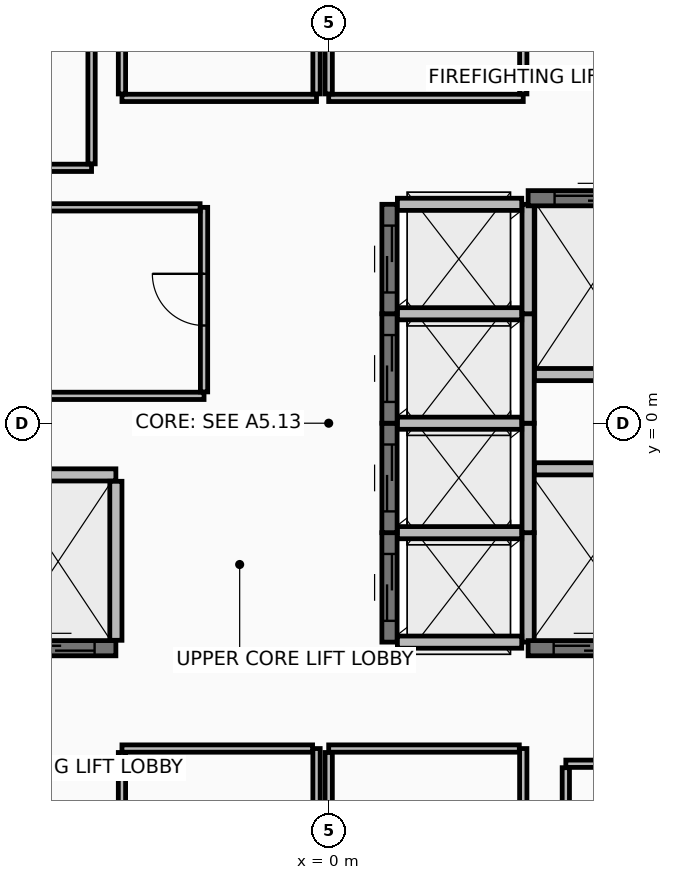
"""IFC4 building model, lengths in metres.
Left out: names, types, materials, properties, quantities, classifications, styles, units other than length and angle.
Written with IfcOpenShell. Run it as: python <this file> out.ifc"""

import sys

from ifc_helpers import new_model, si_unit, direction, frame, frame_2d, origin, place, context, subcontext, project, spatial, rectangle, extrude, element, fill, save


model = new_model("IFC4")
c1 = context("Model", 3, precision=1e-05, world=origin(), true_north=direction((0.0, 1.0)))
c2 = subcontext(c1, "Body", "Model", "MODEL_VIEW")
j1 = project(units=[si_unit("LENGTHUNIT", "METRE"), si_unit("PLANEANGLEUNIT", "RADIAN")], contexts=[c1])
p1 = place(None, origin())
s1 = spatial("IfcSite", under=j1, at=p1, CompositionType="ELEMENT")
p2 = place(p1, origin())
s2 = spatial("IfcBuilding", under=s1, at=p2, CompositionType="ELEMENT")
p3 = place(p2, frame((0.0, 0.0, 279.75)))
s3 = spatial("IfcBuildingStorey", under=s2, at=p3, CompositionType="ELEMENT", Elevation=279.75)
p4 = place(p3, frame((1.0, -3.6, 0.0), z_axis=(0.0, 0.0, 1.0), x_axis=(0.0, 1.0, 0.0)))
e1 = element("IfcWall", 1, at=p4, inside=s3, PredefinedType="SHEAR", context=c2, shape_type="SweptSolid", body=[
    extrude(rectangle(XDim=1.8, YDim=0.25, at=frame_2d((0.9, 0.0))), origin(), (0.0, 0.0, 1.0), 3.465),
])
p5 = place(p4, frame((0.35, 0.0, 0.0)))
e2 = element("IfcOpeningElement", 2, at=p5, cuts=e1, PredefinedType="OPENING", context=c2, shape_type="SweptSolid", body=[
    extrude(rectangle(XDim=1.1, YDim=2.2, at=frame_2d((0.55, 1.1))), frame((0.0, 0.135, 0.0), z_axis=(0.0, -1.0, 0.0), x_axis=(1.0, 0.0, 0.0)), (0.0, 0.0, 1.0), 0.27),
])
p6 = place(p3, frame((3.28, -3.6, 0.0), z_axis=(0.0, 0.0, 1.0), x_axis=(0.0, 1.0, 0.0)))
e3 = element("IfcWall", 3, at=p6, inside=s3, PredefinedType="PARTITIONING", context=c2, shape_type="SweptSolid", body=[
    extrude(rectangle(XDim=1.8, YDim=0.2, at=frame_2d((0.9, 0.0))), origin(), (0.0, 0.0, 1.0), 3.465),
])
for number, where, z_axis, x_axis in (
    (4, (1.13, -3.6, 0.0), (0.0, 0.0, 1.0), (1.0, 0.0, 0.0)),
    (5, (1.13, -1.8, 0.0), (0.0, 0.0, 1.0), (1.0, 0.0, 0.0)),
):
    element("IfcWall", number, at=place(p3, frame(where, z_axis=z_axis, x_axis=x_axis)), inside=s3, PredefinedType="PARTITIONING", context=c2, shape_type="SweptSolid", body=[
        extrude(rectangle(XDim=2.045, YDim=0.2, at=frame_2d((1.022, 0.0))), origin(), (0.0, 0.0, 1.0), 3.465),
    ])
p7 = place(p3, frame((1.0, -1.8, 0.0), z_axis=(0.0, 0.0, 1.0), x_axis=(0.0, 1.0, 0.0)))
e6 = element("IfcWall", 6, at=p7, inside=s3, PredefinedType="SHEAR", context=c2, shape_type="SweptSolid", body=[
    extrude(rectangle(XDim=1.8, YDim=0.25, at=frame_2d((0.9, 0.0))), origin(), (0.0, 0.0, 1.0), 3.465),
])
p8 = place(p7, frame((0.35, 0.0, 0.0)))
e7 = element("IfcOpeningElement", 7, at=p8, cuts=e6, PredefinedType="OPENING", context=c2, shape_type="SweptSolid", body=[
    extrude(rectangle(XDim=1.1, YDim=2.2, at=frame_2d((0.55, 1.1))), frame((0.0, 0.135, 0.0), z_axis=(0.0, -1.0, 0.0), x_axis=(1.0, 0.0, 0.0)), (0.0, 0.0, 1.0), 0.27),
])
p9 = place(p3, frame((3.28, -1.8, 0.0), z_axis=(0.0, 0.0, 1.0), x_axis=(0.0, 1.0, 0.0)))
e8 = element("IfcWall", 8, at=p9, inside=s3, PredefinedType="PARTITIONING", context=c2, shape_type="SweptSolid", body=[
    extrude(rectangle(XDim=1.8, YDim=0.2, at=frame_2d((0.9, 0.0))), origin(), (0.0, 0.0, 1.0), 3.465),
])
p10 = place(p3, frame((1.13, 0.0, 0.0), z_axis=(0.0, 0.0, 1.0), x_axis=(1.0, 0.0, 0.0)))
e9 = element("IfcWall", 9, at=p10, inside=s3, PredefinedType="PARTITIONING", context=c2, shape_type="SweptSolid", body=[
    extrude(rectangle(XDim=2.045, YDim=0.2, at=frame_2d((1.022, 0.0))), origin(), (0.0, 0.0, 1.0), 3.465),
])
p11 = place(p3, frame((1.0, 0.0, 0.0), z_axis=(0.0, 0.0, 1.0), x_axis=(0.0, 1.0, 0.0)))
e10 = element("IfcWall", 10, at=p11, inside=s3, PredefinedType="SHEAR", context=c2, shape_type="SweptSolid", body=[
    extrude(rectangle(XDim=1.8, YDim=0.25, at=frame_2d((0.9, 0.0))), origin(), (0.0, 0.0, 1.0), 3.465),
])
p12 = place(p11, frame((0.35, 0.0, 0.0)))
e11 = element("IfcOpeningElement", 11, at=p12, cuts=e10, PredefinedType="OPENING", context=c2, shape_type="SweptSolid", body=[
    extrude(rectangle(XDim=1.1, YDim=2.2, at=frame_2d((0.55, 1.1))), frame((0.0, 0.135, 0.0), z_axis=(0.0, -1.0, 0.0), x_axis=(1.0, 0.0, 0.0)), (0.0, 0.0, 1.0), 0.27),
])
p13 = place(p3, frame((3.28, 0.0, 0.0), z_axis=(0.0, 0.0, 1.0), x_axis=(0.0, 1.0, 0.0)))
e12 = element("IfcWall", 12, at=p13, inside=s3, PredefinedType="PARTITIONING", context=c2, shape_type="SweptSolid", body=[
    extrude(rectangle(XDim=1.8, YDim=0.2, at=frame_2d((0.9, 0.0))), origin(), (0.0, 0.0, 1.0), 3.465),
])
p14 = place(p3, frame((1.13, 1.8, 0.0), z_axis=(0.0, 0.0, 1.0), x_axis=(1.0, 0.0, 0.0)))
e13 = element("IfcWall", 13, at=p14, inside=s3, PredefinedType="PARTITIONING", context=c2, shape_type="SweptSolid", body=[
    extrude(rectangle(XDim=2.045, YDim=0.2, at=frame_2d((1.022, 0.0))), origin(), (0.0, 0.0, 1.0), 3.465),
])
p15 = place(p3, frame((1.0, 1.8, 0.0), z_axis=(0.0, 0.0, 1.0), x_axis=(0.0, 1.0, 0.0)))
e14 = element("IfcWall", 14, at=p15, inside=s3, PredefinedType="SHEAR", context=c2, shape_type="SweptSolid", body=[
    extrude(rectangle(XDim=1.8, YDim=0.25, at=frame_2d((0.9, 0.0))), origin(), (0.0, 0.0, 1.0), 3.465),
])
p16 = place(p15, frame((0.35, 0.0, 0.0)))
e15 = element("IfcOpeningElement", 15, at=p16, cuts=e14, PredefinedType="OPENING", context=c2, shape_type="SweptSolid", body=[
    extrude(rectangle(XDim=1.1, YDim=2.2, at=frame_2d((0.55, 1.1))), frame((0.0, 0.135, 0.0), z_axis=(0.0, -1.0, 0.0), x_axis=(1.0, 0.0, 0.0)), (0.0, 0.0, 1.0), 0.27),
])
p17 = place(p3, frame((3.28, 1.8, 0.0), z_axis=(0.0, 0.0, 1.0), x_axis=(0.0, 1.0, 0.0)))
e16 = element("IfcWall", 16, at=p17, inside=s3, PredefinedType="PARTITIONING", context=c2, shape_type="SweptSolid", body=[
    extrude(rectangle(XDim=1.8, YDim=0.2, at=frame_2d((0.9, 0.0))), origin(), (0.0, 0.0, 1.0), 3.465),
])
p18 = place(p3, frame((1.13, 3.6, 0.0), z_axis=(0.0, 0.0, 1.0), x_axis=(1.0, 0.0, 0.0)))
e17 = element("IfcWall", 17, at=p18, inside=s3, PredefinedType="PARTITIONING", context=c2, shape_type="SweptSolid", body=[
    extrude(rectangle(XDim=2.045, YDim=0.2, at=frame_2d((1.022, 0.0))), origin(), (0.0, 0.0, 1.0), 2.76),
])
p19 = place(p3, frame((-5.4, -3.7, 0.0), z_axis=(0.0, 0.0, 1.0), x_axis=(1.0, 0.0, 0.0)))
e18 = element("IfcWall", 18, at=p19, inside=s3, PredefinedType="SHEAR", context=c2, shape_type="SweptSolid", body=[
    extrude(rectangle(XDim=1.9, YDim=0.25, at=frame_2d((0.95, 0.0))), origin(), (0.0, 0.0, 1.0), 3.465),
])
p20 = place(p19, frame((0.35, 0.0, 0.0)))
e19 = element("IfcOpeningElement", 19, at=p20, cuts=e18, PredefinedType="OPENING", context=c2, shape_type="SweptSolid", body=[
    extrude(rectangle(XDim=1.2, YDim=2.2, at=frame_2d((0.6, 1.1))), frame((0.0, 0.135, 0.0), z_axis=(0.0, -1.0, 0.0), x_axis=(1.0, 0.0, 0.0)), (0.0, 0.0, 1.0), 0.27),
])
p21 = place(p3, frame((-5.27, -0.85, 0.0), z_axis=(0.0, 0.0, 1.0), x_axis=(1.0, 0.0, 0.0)))
e20 = element("IfcWall", 20, at=p21, inside=s3, PredefinedType="PARTITIONING", context=c2, shape_type="SweptSolid", body=[
    extrude(rectangle(XDim=1.77, YDim=0.2, at=frame_2d((0.885, 0.0))), origin(), (0.0, 0.0, 1.0), 3.465),
])
p22 = place(p3, frame((-3.5, -3.57, 0.0), z_axis=(0.0, 0.0, 1.0), x_axis=(0.0, 1.0, 0.0)))
e21 = element("IfcWall", 21, at=p22, inside=s3, PredefinedType="PARTITIONING", context=c2, shape_type="SweptSolid", body=[
    extrude(rectangle(XDim=2.615, YDim=0.2, at=frame_2d((1.308, 0.0))), origin(), (0.0, 0.0, 1.0), 3.465),
])
p23 = place(p3, frame((3.28, 3.7, 0.0), z_axis=(0.0, 0.0, 1.0), x_axis=(1.0, 0.0, 0.0)))
e22 = element("IfcWall", 22, at=p23, inside=s3, PredefinedType="SHEAR", context=c2, shape_type="SweptSolid", body=[
    extrude(rectangle(XDim=2.07, YDim=0.25, at=frame_2d((1.035, 0.0))), origin(), (0.0, 0.0, 1.0), 3.465),
])
p24 = place(p23, frame((0.435, 0.0, 0.0)))
e23 = element("IfcOpeningElement", 23, at=p24, cuts=e22, PredefinedType="OPENING", context=c2, shape_type="SweptSolid", body=[
    extrude(rectangle(XDim=1.2, YDim=2.2, at=frame_2d((0.6, 1.1))), frame((0.0, 0.135, 0.0), z_axis=(0.0, -1.0, 0.0), x_axis=(1.0, 0.0, 0.0)), (0.0, 0.0, 1.0), 0.27),
])
p25 = place(p3, frame((3.385, 0.8, 0.0), z_axis=(0.0, 0.0, 1.0), x_axis=(1.0, 0.0, 0.0)))
e24 = element("IfcWall", 24, at=p25, inside=s3, PredefinedType="PARTITIONING", context=c2, shape_type="SweptSolid", body=[
    extrude(rectangle(XDim=1.835, YDim=0.2, at=frame_2d((0.917, 0.0))), origin(), (0.0, 0.0, 1.0), 3.465),
])
p26 = place(p3, frame((3.28, -3.7, 0.0), z_axis=(0.0, 0.0, 1.0), x_axis=(1.0, 0.0, 0.0)))
e25 = element("IfcWall", 25, at=p26, inside=s3, PredefinedType="SHEAR", context=c2, shape_type="SweptSolid", body=[
    extrude(rectangle(XDim=1.94, YDim=0.25, at=frame_2d((0.97, 0.0))), origin(), (0.0, 0.0, 1.0), 3.465),
])
p27 = place(p26, frame((0.42, 0.0, 0.0)))
e26 = element("IfcOpeningElement", 26, at=p27, cuts=e25, PredefinedType="OPENING", context=c2, shape_type="SweptSolid", body=[
    extrude(rectangle(XDim=1.1, YDim=2.2, at=frame_2d((0.55, 1.1))), frame((0.0, 0.135, 0.0), z_axis=(0.0, -1.0, 0.0), x_axis=(1.0, 0.0, 0.0)), (0.0, 0.0, 1.0), 0.27),
])
p28 = place(p3, frame((3.385, -0.75, 0.0), z_axis=(0.0, 0.0, 1.0), x_axis=(1.0, 0.0, 0.0)))
e27 = element("IfcWall", 27, at=p28, inside=s3, PredefinedType="PARTITIONING", context=c2, shape_type="SweptSolid", body=[
    extrude(rectangle(XDim=1.835, YDim=0.2, at=frame_2d((0.917, 0.0))), origin(), (0.0, 0.0, 1.0), 3.465),
])
p29 = place(p3, frame((-5.22, 0.45, 0.0), z_axis=(0.0, 0.0, 1.0), x_axis=(1.0, 0.0, 0.0)))
e28 = element("IfcWall", 28, at=p29, inside=s3, PredefinedType="PARTITIONING", context=c2, shape_type="SweptSolid", body=[
    extrude(rectangle(XDim=3.17, YDim=0.12, at=frame_2d((1.585, 0.0))), origin(), (0.0, 0.0, 1.0), 3.465),
])
p30 = place(p3, frame((-2.05, 0.515, 0.0), z_axis=(0.0, 0.0, 1.0), x_axis=(0.0, 1.0, 0.0)))
e29 = element("IfcWall", 29, at=p30, inside=s3, PredefinedType="PARTITIONING", context=c2, shape_type="SweptSolid", body=[
    extrude(rectangle(XDim=3.035, YDim=0.12, at=frame_2d((1.518, 0.0))), origin(), (0.0, 0.0, 1.0), 3.465),
])
p31 = place(p30, frame((1.092, 0.0, 0.0)))
e30 = element("IfcOpeningElement", 30, at=p31, cuts=e29, PredefinedType="OPENING", context=c2, shape_type="SweptSolid", body=[
    extrude(rectangle(XDim=0.85, YDim=2.1, at=frame_2d((0.425, 1.05))), frame((0.0, 0.07, 0.0), z_axis=(0.0, -1.0, 0.0), x_axis=(1.0, 0.0, 0.0)), (0.0, 0.0, 1.0), 0.14),
])
p32 = place(p3, frame((-2.115, 3.55, 0.0), z_axis=(0.0, 0.0, 1.0), x_axis=(-1.0, 0.0, 0.0)))
e31 = element("IfcWall", 31, at=p32, inside=s3, PredefinedType="PARTITIONING", context=c2, shape_type="SweptSolid", body=[
    extrude(rectangle(XDim=3.105, YDim=0.12, at=frame_2d((1.552, 0.0))), origin(), (0.0, 0.0, 1.0), 3.465),
])
p33 = place(p3, frame((-0.2, -7.42, 0.0), z_axis=(0.0, 0.0, 1.0), x_axis=(0.0, 1.0, 0.0)))
e32 = element("IfcWall", 32, at=p33, inside=s3, PredefinedType="PARTITIONING", context=c2, shape_type="SweptSolid", body=[
    extrude(rectangle(XDim=2.07, YDim=0.12, at=frame_2d((1.035, 0.0))), origin(), (0.0, 0.0, 1.0), 2.76),
])
p34 = place(p3, frame((-0.265, -5.35, 0.0), z_axis=(0.0, 0.0, 1.0), x_axis=(-1.0, 0.0, 0.0)))
e33 = element("IfcWall", 33, at=p34, inside=s3, PredefinedType="PARTITIONING", context=c2, shape_type="SweptSolid", body=[
    extrude(rectangle(XDim=3.135, YDim=0.12, at=frame_2d((1.567, 0.0))), origin(), (0.0, 0.0, 1.0), 2.76),
])
p35 = place(p3, frame((-3.4, -5.415, 0.0), z_axis=(0.0, 0.0, 1.0), x_axis=(0.0, -1.0, 0.0)))
e34 = element("IfcWall", 34, at=p35, inside=s3, PredefinedType="PARTITIONING", context=c2, shape_type="SweptSolid", body=[
    extrude(rectangle(XDim=2.8, YDim=0.12, at=frame_2d((1.4, 0.0))), origin(), (0.0, 0.0, 1.0), 2.76),
])
p36 = place(p3, frame((3.2, -8.215, 0.0), z_axis=(0.0, 0.0, 1.0), x_axis=(0.0, 1.0, 0.0)))
e35 = element("IfcWall", 35, at=p36, inside=s3, PredefinedType="PARTITIONING", context=c2, shape_type="SweptSolid", body=[
    extrude(rectangle(XDim=2.865, YDim=0.12, at=frame_2d((1.433, 0.0))), origin(), (0.0, 0.0, 1.0), 2.76),
])
p37 = place(p3, frame((3.135, -5.35, 0.0), z_axis=(0.0, 0.0, 1.0), x_axis=(-1.0, 0.0, 0.0)))
e36 = element("IfcWall", 36, at=p37, inside=s3, PredefinedType="PARTITIONING", context=c2, shape_type="SweptSolid", body=[
    extrude(rectangle(XDim=3.135, YDim=0.12, at=frame_2d((1.567, 0.0))), origin(), (0.0, 0.0, 1.0), 3.465),
])
p38 = place(p3, frame((0.0, -5.415, 0.0), z_axis=(0.0, 0.0, 1.0), x_axis=(0.0, -1.0, 0.0)))
e37 = element("IfcWall", 37, at=p38, inside=s3, PredefinedType="PARTITIONING", context=c2, shape_type="SweptSolid", body=[
    extrude(rectangle(XDim=2.005, YDim=0.12, at=frame_2d((1.002, 0.0))), origin(), (0.0, 0.0, 1.0), 2.76),
])
p39 = place(p3, frame((-3.4, 5.35, 0.0), z_axis=(0.0, 0.0, 1.0), x_axis=(1.0, 0.0, 0.0)))
e38 = element("IfcWall", 38, at=p39, inside=s3, PredefinedType="PARTITIONING", context=c2, shape_type="SweptSolid", body=[
    extrude(rectangle(XDim=3.2, YDim=0.12, at=frame_2d((1.6, 0.0))), origin(), (0.0, 0.0, 1.0), 3.465),
])
p40 = place(p3, frame((-0.2, 5.415, 0.0), z_axis=(0.0, 0.0, 1.0), x_axis=(0.0, 1.0, 0.0)))
e39 = element("IfcWall", 39, at=p40, inside=s3, PredefinedType="PARTITIONING", context=c2, shape_type="SweptSolid", body=[
    extrude(rectangle(XDim=2.005, YDim=0.12, at=frame_2d((1.002, 0.0))), origin(), (0.0, 0.0, 1.0), 2.76),
])
p41 = place(p3, frame((-3.4, 8.215, 0.0), z_axis=(0.0, 0.0, 1.0), x_axis=(0.0, -1.0, 0.0)))
e40 = element("IfcWall", 40, at=p41, inside=s3, PredefinedType="PARTITIONING", context=c2, shape_type="SweptSolid", body=[
    extrude(rectangle(XDim=2.8, YDim=0.12, at=frame_2d((1.4, 0.0))), origin(), (0.0, 0.0, 1.0), 2.76),
])
p42 = place(p3, frame((0.0, 5.35, 0.0), z_axis=(0.0, 0.0, 1.0), x_axis=(1.0, 0.0, 0.0)))
e41 = element("IfcWall", 41, at=p42, inside=s3, PredefinedType="PARTITIONING", context=c2, shape_type="SweptSolid", body=[
    extrude(rectangle(XDim=3.2, YDim=0.12, at=frame_2d((1.6, 0.0))), origin(), (0.0, 0.0, 1.0), 2.76),
])
p43 = place(p3, frame((3.2, 5.415, 0.0), z_axis=(0.0, 0.0, 1.0), x_axis=(0.0, 1.0, 0.0)))
e42 = element("IfcWall", 42, at=p43, inside=s3, PredefinedType="PARTITIONING", context=c2, shape_type="SweptSolid", body=[
    extrude(rectangle(XDim=2.8, YDim=0.12, at=frame_2d((1.4, 0.0))), origin(), (0.0, 0.0, 1.0), 2.76),
])
p44 = place(p3, frame((0.0, 7.42, 0.0), z_axis=(0.0, 0.0, 1.0), x_axis=(0.0, -1.0, 0.0)))
e43 = element("IfcWall", 43, at=p44, inside=s3, PredefinedType="PARTITIONING", context=c2, shape_type="SweptSolid", body=[
    extrude(rectangle(XDim=2.005, YDim=0.12, at=frame_2d((1.002, 0.0))), origin(), (0.0, 0.0, 1.0), 2.76),
])
p45 = place(p3, frame((-6.35, 4.2, 0.0), z_axis=(0.0, 0.0, 1.0), x_axis=(1.0, 0.0, 0.0)))
e44 = element("IfcWall", 44, at=p45, inside=s3, PredefinedType="PARTITIONING", context=c2, shape_type="SweptSolid", body=[
    extrude(rectangle(XDim=2.45, YDim=0.12, at=frame_2d((1.225, 0.0))), origin(), (0.0, 0.0, 1.0), 3.465),
])
p46 = place(p3, frame((-3.9, 4.265, 0.0), z_axis=(0.0, 0.0, 1.0), x_axis=(0.0, 1.0, 0.0)))
e45 = element("IfcWall", 45, at=p46, inside=s3, PredefinedType="PARTITIONING", context=c2, shape_type="SweptSolid", body=[
    extrude(rectangle(XDim=3.95, YDim=0.12, at=frame_2d((1.975, 0.0))), origin(), (0.0, 0.0, 1.0), 2.76),
])
p47 = place(p3, frame((5.635, -5.6, 0.0), z_axis=(0.0, 0.0, 1.0), x_axis=(-1.0, 0.0, 0.0)))
e46 = element("IfcWall", 46, at=p47, inside=s3, PredefinedType="PARTITIONING", context=c2, shape_type="SweptSolid", body=[
    extrude(rectangle(XDim=1.735, YDim=0.12, at=frame_2d((0.868, 0.0))), origin(), (0.0, 0.0, 1.0), 3.465),
])
p48 = place(p3, frame((3.9, -5.665, 0.0), z_axis=(0.0, 0.0, 1.0), x_axis=(0.0, -1.0, 0.0)))
e47 = element("IfcWall", 47, at=p48, inside=s3, PredefinedType="PARTITIONING", context=c2, shape_type="SweptSolid", body=[
    extrude(rectangle(XDim=2.55, YDim=0.12, at=frame_2d((1.275, 0.0))), origin(), (0.0, 0.0, 1.0), 2.76),
])
p49 = place(p5, origin())
e48 = element("IfcDoor", 48, at=p49, inside=s3, OperationType="SLIDING_TO_LEFT", PredefinedType="DOOR", context=c2, shape_type="SweptSolid", body=[
    extrude(rectangle(XDim=1.1, YDim=2.2, at=frame_2d((0.55, 1.1))), frame((0.0, 0.025, 0.0), z_axis=(0.0, -1.0, 0.0), x_axis=(1.0, 0.0, 0.0)), (0.0, 0.0, 1.0), 0.05),
])
fill(e2, e48)
p50 = place(p8, origin())
e49 = element("IfcDoor", 49, at=p50, inside=s3, OperationType="SLIDING_TO_LEFT", PredefinedType="DOOR", context=c2, shape_type="SweptSolid", body=[
    extrude(rectangle(XDim=1.1, YDim=2.2, at=frame_2d((0.55, 1.1))), frame((0.0, 0.025, 0.0), z_axis=(0.0, -1.0, 0.0), x_axis=(1.0, 0.0, 0.0)), (0.0, 0.0, 1.0), 0.05),
])
fill(e7, e49)
p51 = place(p12, origin())
e50 = element("IfcDoor", 50, at=p51, inside=s3, OperationType="SLIDING_TO_LEFT", PredefinedType="DOOR", context=c2, shape_type="SweptSolid", body=[
    extrude(rectangle(XDim=1.1, YDim=2.2, at=frame_2d((0.55, 1.1))), frame((0.0, 0.025, 0.0), z_axis=(0.0, -1.0, 0.0), x_axis=(1.0, 0.0, 0.0)), (0.0, 0.0, 1.0), 0.05),
])
fill(e11, e50)
p52 = place(p16, origin())
e51 = element("IfcDoor", 51, at=p52, inside=s3, OperationType="SLIDING_TO_LEFT", PredefinedType="DOOR", context=c2, shape_type="SweptSolid", body=[
    extrude(rectangle(XDim=1.1, YDim=2.2, at=frame_2d((0.55, 1.1))), frame((0.0, 0.025, 0.0), z_axis=(0.0, -1.0, 0.0), x_axis=(1.0, 0.0, 0.0)), (0.0, 0.0, 1.0), 0.05),
])
fill(e15, e51)
p53 = place(p20, origin())
e52 = element("IfcDoor", 52, at=p53, inside=s3, OperationType="SLIDING_TO_RIGHT", PredefinedType="DOOR", context=c2, shape_type="SweptSolid", body=[
    extrude(rectangle(XDim=1.2, YDim=2.2, at=frame_2d((0.6, 1.1))), frame((0.0, 0.025, 0.0), z_axis=(0.0, -1.0, 0.0), x_axis=(1.0, 0.0, 0.0)), (0.0, 0.0, 1.0), 0.05),
])
fill(e19, e52)
p54 = place(p24, origin())
e53 = element("IfcDoor", 53, at=p54, inside=s3, OperationType="SLIDING_TO_RIGHT", PredefinedType="DOOR", context=c2, shape_type="SweptSolid", body=[
    extrude(rectangle(XDim=1.2, YDim=2.2, at=frame_2d((0.6, 1.1))), frame((0.0, 0.025, 0.0), z_axis=(0.0, -1.0, 0.0), x_axis=(1.0, 0.0, 0.0)), (0.0, 0.0, 1.0), 0.05),
])
fill(e23, e53)
p55 = place(p27, origin())
e54 = element("IfcDoor", 54, at=p55, inside=s3, OperationType="SLIDING_TO_LEFT", PredefinedType="DOOR", context=c2, shape_type="SweptSolid", body=[
    extrude(rectangle(XDim=1.1, YDim=2.2, at=frame_2d((0.55, 1.1))), frame((0.0, 0.025, 0.0), z_axis=(0.0, -1.0, 0.0), x_axis=(1.0, 0.0, 0.0)), (0.0, 0.0, 1.0), 0.05),
])
fill(e26, e54)
p56 = place(p31, frame((0.85, 0.0, 0.0), z_axis=(0.0, 0.0, 1.0), x_axis=(-1.0, 0.0, 0.0)))
e55 = element("IfcDoor", 55, at=p56, inside=s3, OperationType="SINGLE_SWING_RIGHT", PredefinedType="DOOR", context=c2, shape_type="SweptSolid", body=[
    extrude(rectangle(XDim=0.85, YDim=2.1, at=frame_2d((0.425, 1.05))), frame((0.0, 0.025, 0.0), z_axis=(0.0, -1.0, 0.0), x_axis=(1.0, 0.0, 0.0)), (0.0, 0.0, 1.0), 0.05),
])
fill(e30, e55)
save(model, sys.argv[1])
